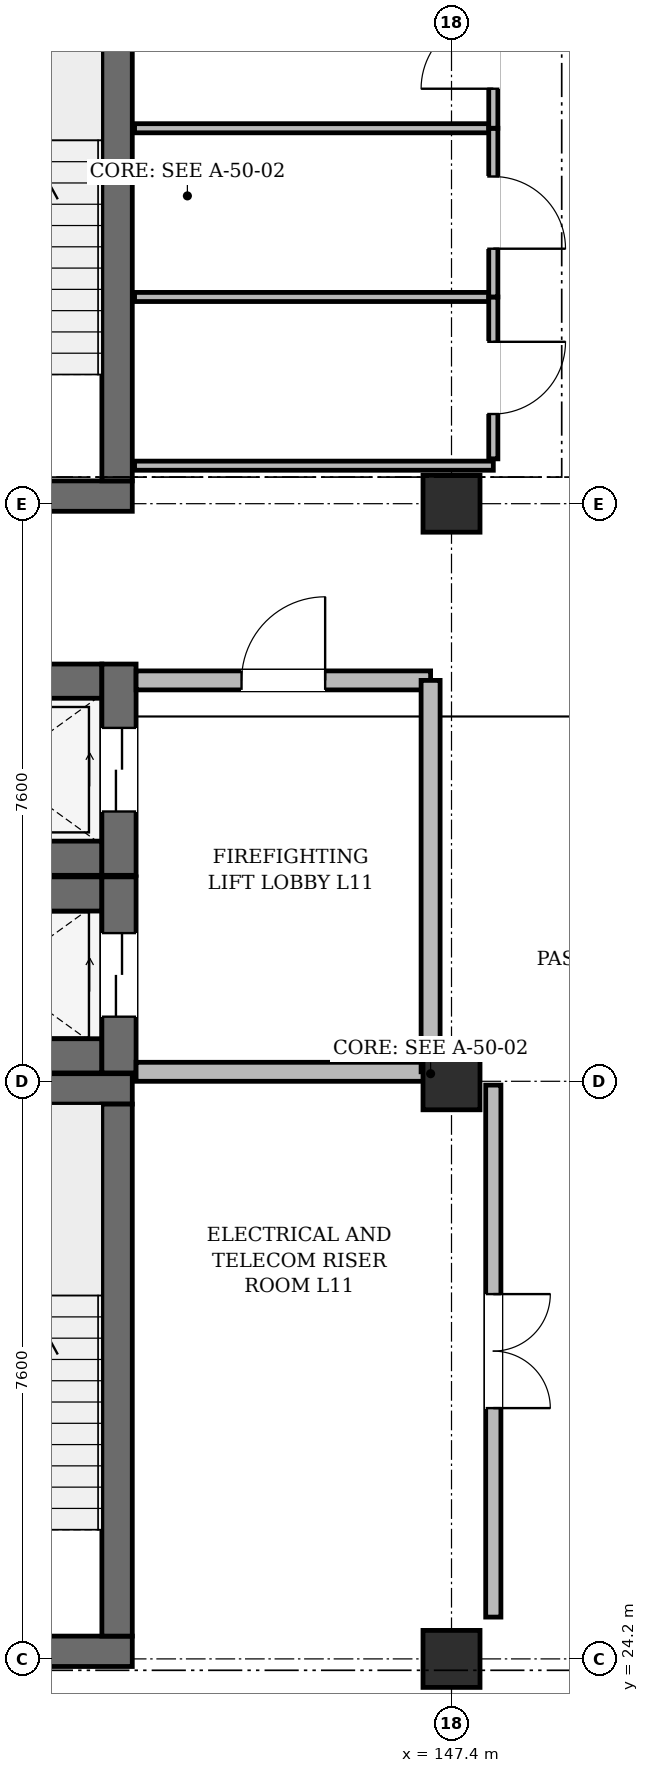
"""IFC4 building model, lengths in metres.
Left out: names, types, materials, properties, quantities, classifications, styles, units other than length and angle.
Written with IfcOpenShell. Run it as: python <this file> out.ifc"""

import sys

from ifc_helpers import new_model, si_unit, direction, frame, frame_2d, origin, origin_2d, place, context, subcontext, project, spatial, rectangle, extrude, element, fill, save


model = new_model("IFC4")
c1 = context("Model", 3, precision=1e-05, world=origin(), true_north=direction((0.0, 1.0)))
c2 = subcontext(c1, "Body", "Model", "MODEL_VIEW")
j1 = project(units=[si_unit("LENGTHUNIT", "METRE"), si_unit("PLANEANGLEUNIT", "RADIAN")], contexts=[c1])
p1 = place(None, origin())
s1 = spatial("IfcSite", under=j1, at=p1, CompositionType="ELEMENT")
p2 = place(p1, origin())
s2 = spatial("IfcBuilding", under=s1, at=p2, CompositionType="ELEMENT")
p3 = place(p2, frame((0.0, 0.0, 49.2)))
s3 = spatial("IfcBuildingStorey", under=s2, at=p3, CompositionType="ELEMENT", Elevation=49.2)
for number, where, z_axis, x_axis in (
    (1, (147.4, 24.2, 0.0), (0.0, 0.0, 1.0), (1.0, 0.0, 0.0)),
    (2, (147.4, 31.8, 0.0), (0.0, 0.0, 1.0), (1.0, 0.0, 0.0)),
    (3, (147.4, 39.4, 0.0), (0.0, 0.0, 1.0), (1.0, 0.0, 0.0)),
):
    element("IfcColumn", number, at=place(p3, frame(where, z_axis=z_axis, x_axis=x_axis)), inside=s3, PredefinedType="COLUMN", context=c2, shape_type="SweptSolid", body=[
        extrude(rectangle(XDim=0.75, YDim=0.75, at=origin_2d()), origin(), (0.0, 0.0, 1.0), 3.9),
    ])
p4 = place(p3, frame((139.4, 24.3, 0.0), z_axis=(0.0, 0.0, 1.0), x_axis=(1.0, 0.0, 0.0)))
e4 = element("IfcWall", 4, at=p4, inside=s3, PredefinedType="SHEAR", context=c2, shape_type="SweptSolid", body=[
    extrude(rectangle(XDim=3.8, YDim=0.4, at=frame_2d((1.9, 0.0))), origin(), (0.0, 0.0, 1.0), 3.9),
])
p5 = place(p4, frame((1.3, 0.0, 0.0)))
e5 = element("IfcOpeningElement", 5, at=p5, cuts=e4, PredefinedType="OPENING", context=c2, shape_type="SweptSolid", body=[
    extrude(rectangle(XDim=1.2, YDim=2.2, at=frame_2d((0.6, 1.1))), frame((0.0, 0.212, 0.0), z_axis=(0.0, -1.0, 0.0), x_axis=(1.0, 0.0, 0.0)), (0.0, 0.0, 1.0), 0.424),
])
p6 = place(p3, frame((139.4, 31.7, 0.0), z_axis=(0.0, 0.0, 1.0), x_axis=(1.0, 0.0, 0.0)))
e6 = element("IfcWall", 6, at=p6, inside=s3, PredefinedType="SHEAR", context=c2, shape_type="SweptSolid", body=[
    extrude(rectangle(XDim=3.8, YDim=0.4, at=frame_2d((1.9, 0.0))), origin(), (0.0, 0.0, 1.0), 3.9),
])
p7 = place(p3, frame((143.0, 24.5, 0.0), z_axis=(0.0, 0.0, 1.0), x_axis=(0.0, 1.0, 0.0)))
e7 = element("IfcWall", 7, at=p7, inside=s3, PredefinedType="SHEAR", context=c2, shape_type="SweptSolid", body=[
    extrude(rectangle(XDim=7.0, YDim=0.4, at=frame_2d((3.5, 0.0))), origin(), (0.0, 0.0, 1.0), 3.9),
])
p8 = place(p3, frame((139.4, 39.5, 0.0), z_axis=(0.0, 0.0, 1.0), x_axis=(1.0, 0.0, 0.0)))
e8 = element("IfcWall", 8, at=p8, inside=s3, PredefinedType="SHEAR", context=c2, shape_type="SweptSolid", body=[
    extrude(rectangle(XDim=3.8, YDim=0.4, at=frame_2d((1.9, 0.0))), origin(), (0.0, 0.0, 1.0), 3.9),
])
p9 = place(p8, frame((1.3, 0.0, 0.0)))
e9 = element("IfcOpeningElement", 9, at=p9, cuts=e8, PredefinedType="OPENING", context=c2, shape_type="SweptSolid", body=[
    extrude(rectangle(XDim=1.2, YDim=2.2, at=frame_2d((0.6, 1.1))), frame((0.0, 0.212, 0.0), z_axis=(0.0, -1.0, 0.0), x_axis=(1.0, 0.0, 0.0)), (0.0, 0.0, 1.0), 0.424),
])
p10 = place(p3, frame((143.0, 39.7, 0.0), z_axis=(0.0, 0.0, 1.0), x_axis=(0.0, 1.0, 0.0)))
e10 = element("IfcWall", 10, at=p10, inside=s3, PredefinedType="SHEAR", context=c2, shape_type="SweptSolid", body=[
    extrude(rectangle(XDim=7.0, YDim=0.4, at=frame_2d((3.5, 0.0))), origin(), (0.0, 0.0, 1.0), 3.9),
])
for number, where, z_axis, x_axis in (
    (11, (140.06, 32.135, 0.0), (0.0, 0.0, 1.0), (1.0, 0.0, 0.0)),
    (12, (140.06, 34.265, 0.0), (0.0, 0.0, 1.0), (1.0, 0.0, 0.0)),
):
    element("IfcWall", number, at=place(p3, frame(where, z_axis=z_axis, x_axis=x_axis)), inside=s3, PredefinedType="SHEAR", context=c2, shape_type="SweptSolid", body=[
        extrude(rectangle(XDim=2.74, YDim=0.45, at=frame_2d((1.37, 0.0))), origin(), (0.0, 0.0, 1.0), 3.9),
    ])
p11 = place(p3, frame((143.025, 31.91, 0.0), z_axis=(0.0, 0.0, 1.0), x_axis=(0.0, 1.0, 0.0)))
e13 = element("IfcWall", 13, at=p11, inside=s3, PredefinedType="SHEAR", context=c2, shape_type="SweptSolid", body=[
    extrude(rectangle(XDim=2.58, YDim=0.45, at=frame_2d((1.29, 0.0))), origin(), (0.0, 0.0, 1.0), 3.9),
])
p12 = place(p11, frame((0.74, 0.0, 0.0)))
e14 = element("IfcOpeningElement", 14, at=p12, cuts=e13, PredefinedType="OPENING", context=c2, shape_type="SweptSolid", body=[
    extrude(rectangle(XDim=1.1, YDim=2.2, at=frame_2d((0.55, 1.1))), frame((0.0, 0.237, 0.0), z_axis=(0.0, -1.0, 0.0), x_axis=(1.0, 0.0, 0.0)), (0.0, 0.0, 1.0), 0.474),
])
for number, where, z_axis, x_axis in (
    (15, (140.06, 34.735, 0.0), (0.0, 0.0, 1.0), (1.0, 0.0, 0.0)),
    (16, (140.06, 37.065, 0.0), (0.0, 0.0, 1.0), (1.0, 0.0, 0.0)),
):
    element("IfcWall", number, at=place(p3, frame(where, z_axis=z_axis, x_axis=x_axis)), inside=s3, PredefinedType="SHEAR", context=c2, shape_type="SweptSolid", body=[
        extrude(rectangle(XDim=2.74, YDim=0.45, at=frame_2d((1.37, 0.0))), origin(), (0.0, 0.0, 1.0), 3.9),
    ])
p13 = place(p3, frame((143.025, 34.51, 0.0), z_axis=(0.0, 0.0, 1.0), x_axis=(0.0, 1.0, 0.0)))
e17 = element("IfcWall", 17, at=p13, inside=s3, PredefinedType="SHEAR", context=c2, shape_type="SweptSolid", body=[
    extrude(rectangle(XDim=2.78, YDim=0.45, at=frame_2d((1.39, 0.0))), origin(), (0.0, 0.0, 1.0), 3.9),
])
p14 = place(p13, frame((0.84, 0.0, 0.0)))
e18 = element("IfcOpeningElement", 18, at=p14, cuts=e17, PredefinedType="OPENING", context=c2, shape_type="SweptSolid", body=[
    extrude(rectangle(XDim=1.1, YDim=2.2, at=frame_2d((0.55, 1.1))), frame((0.0, 0.237, 0.0), z_axis=(0.0, -1.0, 0.0), x_axis=(1.0, 0.0, 0.0)), (0.0, 0.0, 1.0), 0.474),
])
p15 = place(p3, frame((143.25, 37.075, 0.0), z_axis=(0.0, 0.0, 1.0), x_axis=(1.0, 0.0, 0.0)))
e19 = element("IfcWall", 19, at=p15, inside=s3, PredefinedType="SOLIDWALL", context=c2, shape_type="SweptSolid", body=[
    extrude(rectangle(XDim=3.875, YDim=0.25, at=frame_2d((1.938, 0.0))), origin(), (0.0, 0.0, 1.0), 3.805),
])
p16 = place(p15, frame((1.387, 0.0, 0.0)))
e20 = element("IfcOpeningElement", 20, at=p16, cuts=e19, PredefinedType="OPENING", context=c2, shape_type="SweptSolid", body=[
    extrude(rectangle(XDim=1.1, YDim=2.2, at=frame_2d((0.55, 1.1))), frame((0.0, 0.137, 0.0), z_axis=(0.0, -1.0, 0.0), x_axis=(1.0, 0.0, 0.0)), (0.0, 0.0, 1.0), 0.274),
])
p17 = place(p3, frame((143.25, 31.925, 0.0), z_axis=(0.0, 0.0, 1.0), x_axis=(1.0, 0.0, 0.0)))
e21 = element("IfcWall", 21, at=p17, inside=s3, PredefinedType="SOLIDWALL", context=c2, shape_type="SweptSolid", body=[
    extrude(rectangle(XDim=3.875, YDim=0.25, at=frame_2d((1.938, 0.0))), origin(), (0.0, 0.0, 1.0), 3.235),
])
p18 = place(p3, frame((147.125, 31.925, 0.0), z_axis=(0.0, 0.0, 1.0), x_axis=(0.0, 1.0, 0.0)))
e22 = element("IfcWall", 22, at=p18, inside=s3, PredefinedType="SOLIDWALL", context=c2, shape_type="SweptSolid", body=[
    extrude(rectangle(XDim=5.15, YDim=0.25, at=frame_2d((2.575, 0.0))), origin(), (0.0, 0.0, 1.0), 3.235),
])
p19 = place(p3, frame((143.23, 39.9, 0.0), z_axis=(0.0, 0.0, 1.0), x_axis=(1.0, 0.0, 0.0)))
e23 = element("IfcWall", 23, at=p19, inside=s3, PredefinedType="PARTITIONING", context=c2, shape_type="SweptSolid", body=[
    extrude(rectangle(XDim=4.72, YDim=0.12, at=frame_2d((2.36, 0.0))), origin(), (0.0, 0.0, 1.0), 3.805),
])
p20 = place(p3, frame((147.95, 31.75, 0.0), z_axis=(0.0, 0.0, 1.0), x_axis=(0.0, -1.0, 0.0)))
e24 = element("IfcWall", 24, at=p20, inside=s3, PredefinedType="PARTITIONING", context=c2, shape_type="SweptSolid", body=[
    extrude(rectangle(XDim=7.0, YDim=0.2, at=frame_2d((3.5, 0.0))), origin(), (0.0, 0.0, 1.0), 3.805),
])
p21 = place(p20, frame((2.75, 0.0, 0.0)))
e25 = element("IfcOpeningElement", 25, at=p21, cuts=e24, PredefinedType="OPENING", context=c2, shape_type="SweptSolid", body=[
    extrude(rectangle(XDim=1.5, YDim=2.2, at=frame_2d((0.75, 1.1))), frame((0.0, 0.112, 0.0), z_axis=(0.0, -1.0, 0.0), x_axis=(1.0, 0.0, 0.0)), (0.0, 0.0, 1.0), 0.224),
])
p22 = place(p3, frame((143.23, 42.12, 0.0), z_axis=(0.0, 0.0, 1.0), x_axis=(1.0, 0.0, 0.0)))
e26 = element("IfcWall", 26, at=p22, inside=s3, PredefinedType="PARTITIONING", context=c2, shape_type="SweptSolid", body=[
    extrude(rectangle(XDim=4.72, YDim=0.12, at=frame_2d((2.36, 0.0))), origin(), (0.0, 0.0, 1.0), 3.375),
])
p23 = place(p3, frame((147.95, 42.12, 0.0), z_axis=(0.0, 0.0, 1.0), x_axis=(0.0, -1.0, 0.0)))
e27 = element("IfcWall", 27, at=p23, inside=s3, PredefinedType="PARTITIONING", context=c2, shape_type="SweptSolid", body=[
    extrude(rectangle(XDim=2.13, YDim=0.12, at=frame_2d((1.065, 0.0))), origin(), (0.0, 0.0, 1.0), 3.805),
])
p24 = place(p23, frame((0.59, 0.0, 0.0)))
e28 = element("IfcOpeningElement", 28, at=p24, cuts=e27, PredefinedType="OPENING", context=c2, shape_type="SweptSolid", body=[
    extrude(rectangle(XDim=0.95, YDim=2.15, at=frame_2d((0.475, 1.075))), frame((0.0, 0.072, 0.0), z_axis=(0.0, -1.0, 0.0), x_axis=(1.0, 0.0, 0.0)), (0.0, 0.0, 1.0), 0.144),
])
p25 = place(p3, frame((143.23, 44.34, 0.0), z_axis=(0.0, 0.0, 1.0), x_axis=(1.0, 0.0, 0.0)))
e29 = element("IfcWall", 29, at=p25, inside=s3, PredefinedType="PARTITIONING", context=c2, shape_type="SweptSolid", body=[
    extrude(rectangle(XDim=4.72, YDim=0.12, at=frame_2d((2.36, 0.0))), origin(), (0.0, 0.0, 1.0), 3.325),
])
p26 = place(p3, frame((147.95, 44.34, 0.0), z_axis=(0.0, 0.0, 1.0), x_axis=(0.0, -1.0, 0.0)))
e30 = element("IfcWall", 30, at=p26, inside=s3, PredefinedType="PARTITIONING", context=c2, shape_type="SweptSolid", body=[
    extrude(rectangle(XDim=2.22, YDim=0.12, at=frame_2d((1.11, 0.0))), origin(), (0.0, 0.0, 1.0), 3.805),
])
p27 = place(p26, frame((0.635, 0.0, 0.0)))
e31 = element("IfcOpeningElement", 31, at=p27, cuts=e30, PredefinedType="OPENING", context=c2, shape_type="SweptSolid", body=[
    extrude(rectangle(XDim=0.95, YDim=2.15, at=frame_2d((0.475, 1.075))), frame((0.0, 0.072, 0.0), z_axis=(0.0, -1.0, 0.0), x_axis=(1.0, 0.0, 0.0)), (0.0, 0.0, 1.0), 0.144),
])
p28 = place(p3, frame((147.95, 46.33, 0.0), z_axis=(0.0, 0.0, 1.0), x_axis=(0.0, -1.0, 0.0)))
e32 = element("IfcWall", 32, at=p28, inside=s3, PredefinedType="PARTITIONING", context=c2, shape_type="SweptSolid", body=[
    extrude(rectangle(XDim=1.99, YDim=0.12, at=frame_2d((0.995, 0.0))), origin(), (0.0, 0.0, 1.0), 3.805),
])
p29 = place(p28, frame((0.52, 0.0, 0.0)))
e33 = element("IfcOpeningElement", 33, at=p29, cuts=e32, PredefinedType="OPENING", context=c2, shape_type="SweptSolid", body=[
    extrude(rectangle(XDim=0.95, YDim=2.15, at=frame_2d((0.475, 1.075))), frame((0.0, 0.072, 0.0), z_axis=(0.0, -1.0, 0.0), x_axis=(1.0, 0.0, 0.0)), (0.0, 0.0, 1.0), 0.144),
])
p30 = place(p12, origin())
e34 = element("IfcDoor", 34, at=p30, inside=s3, OperationType="DOUBLE_DOOR_SLIDING", PredefinedType="DOOR", context=c2, shape_type="SweptSolid", body=[
    extrude(rectangle(XDim=1.1, YDim=2.2, at=frame_2d((0.55, 1.1))), frame((0.0, 0.025, 0.0), z_axis=(0.0, -1.0, 0.0), x_axis=(1.0, 0.0, 0.0)), (0.0, 0.0, 1.0), 0.05),
])
fill(e14, e34)
p31 = place(p14, origin())
e35 = element("IfcDoor", 35, at=p31, inside=s3, OperationType="DOUBLE_DOOR_SLIDING", PredefinedType="DOOR", context=c2, shape_type="SweptSolid", body=[
    extrude(rectangle(XDim=1.1, YDim=2.2, at=frame_2d((0.55, 1.1))), frame((0.0, 0.025, 0.0), z_axis=(0.0, -1.0, 0.0), x_axis=(1.0, 0.0, 0.0)), (0.0, 0.0, 1.0), 0.05),
])
fill(e18, e35)
p32 = place(p16, origin())
e36 = element("IfcDoor", 36, at=p32, inside=s3, OperationType="SINGLE_SWING_RIGHT", PredefinedType="DOOR", context=c2, shape_type="SweptSolid", body=[
    extrude(rectangle(XDim=1.1, YDim=2.2, at=frame_2d((0.55, 1.1))), frame((0.0, 0.025, 0.0), z_axis=(0.0, -1.0, 0.0), x_axis=(1.0, 0.0, 0.0)), (0.0, 0.0, 1.0), 0.05),
])
fill(e20, e36)
p33 = place(p21, origin())
e37 = element("IfcDoor", 37, at=p33, inside=s3, OperationType="DOUBLE_DOOR_SINGLE_SWING", PredefinedType="DOOR", context=c2, shape_type="SweptSolid", body=[
    extrude(rectangle(XDim=1.5, YDim=2.2, at=frame_2d((0.75, 1.1))), frame((0.0, 0.025, 0.0), z_axis=(0.0, -1.0, 0.0), x_axis=(1.0, 0.0, 0.0)), (0.0, 0.0, 1.0), 0.05),
])
fill(e25, e37)
p34 = place(p24, origin())
e38 = element("IfcDoor", 38, at=p34, inside=s3, OperationType="SINGLE_SWING_LEFT", PredefinedType="DOOR", context=c2, shape_type="SweptSolid", body=[
    extrude(rectangle(XDim=0.95, YDim=2.15, at=frame_2d((0.475, 1.075))), frame((0.0, 0.025, 0.0), z_axis=(0.0, -1.0, 0.0), x_axis=(1.0, 0.0, 0.0)), (0.0, 0.0, 1.0), 0.05),
])
fill(e28, e38)
p35 = place(p27, origin())
e39 = element("IfcDoor", 39, at=p35, inside=s3, OperationType="SINGLE_SWING_RIGHT", PredefinedType="DOOR", context=c2, shape_type="SweptSolid", body=[
    extrude(rectangle(XDim=0.95, YDim=2.15, at=frame_2d((0.475, 1.075))), frame((0.0, 0.025, 0.0), z_axis=(0.0, -1.0, 0.0), x_axis=(1.0, 0.0, 0.0)), (0.0, 0.0, 1.0), 0.05),
])
fill(e31, e39)
p36 = place(p29, frame((0.95, 0.0, 0.0), z_axis=(0.0, 0.0, 1.0), x_axis=(-1.0, 0.0, 0.0)))
e40 = element("IfcDoor", 40, at=p36, inside=s3, OperationType="SINGLE_SWING_LEFT", PredefinedType="DOOR", context=c2, shape_type="SweptSolid", body=[
    extrude(rectangle(XDim=0.95, YDim=2.15, at=frame_2d((0.475, 1.075))), frame((0.0, 0.025, 0.0), z_axis=(0.0, -1.0, 0.0), x_axis=(1.0, 0.0, 0.0)), (0.0, 0.0, 1.0), 0.05),
])
fill(e33, e40)
save(model, sys.argv[1])
